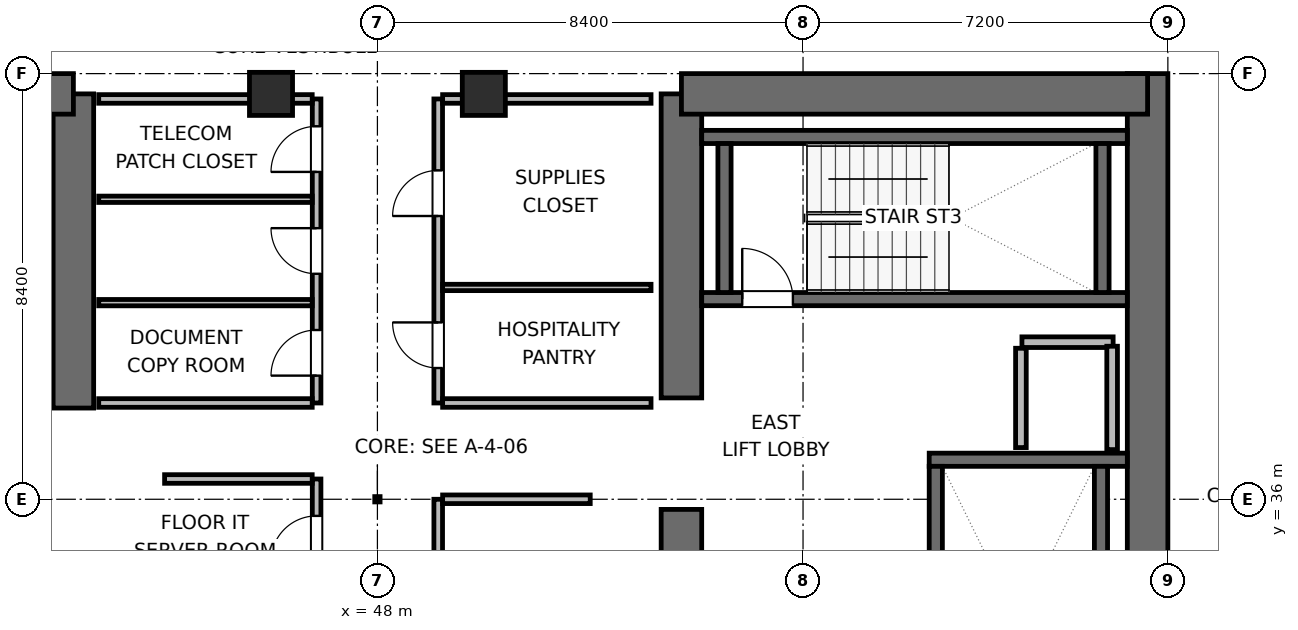
"""IFC4 building model, lengths in metres.
Left out: names, types, materials, properties, quantities, classifications, styles, units other than length and angle.
Written with IfcOpenShell. Run it as: python <this file> out.ifc"""

import sys

from ifc_helpers import new_model, si_unit, direction, frame, frame_2d, origin, origin_2d, place, context, subcontext, project, spatial, rectangle, extrude, element, fill, save


model = new_model("IFC4")
c1 = context("Model", 3, precision=1e-05, world=origin(), true_north=direction((0.0, 1.0)))
c2 = subcontext(c1, "Body", "Model", "MODEL_VIEW")
j1 = project(units=[si_unit("LENGTHUNIT", "METRE"), si_unit("PLANEANGLEUNIT", "RADIAN")], contexts=[c1])
p1 = place(None, origin())
s1 = spatial("IfcSite", under=j1, at=p1, CompositionType="ELEMENT")
p2 = place(p1, origin())
s2 = spatial("IfcBuilding", under=s1, at=p2, CompositionType="ELEMENT")
p3 = place(p2, frame((0.0, 0.0, 105.3)))
s3 = spatial("IfcBuildingStorey", under=s2, at=p3, CompositionType="ELEMENT", Elevation=105.3)
p4 = place(p3, frame((42.0, 37.8, 0.0), z_axis=(0.0, 0.0, 1.0), x_axis=(0.0, 1.0, 0.0)))
e1 = element("IfcWall", 1, at=p4, inside=s3, PredefinedType="SHEAR", context=c2, shape_type="SweptSolid", body=[
    extrude(rectangle(XDim=6.2, YDim=0.8, at=frame_2d((3.1, 0.0))), origin(), (0.0, 0.0, 1.0), 3.9),
])
p5 = place(p3, frame((32.8, 44.0, 0.0), z_axis=(0.0, 0.0, 1.0), x_axis=(1.0, 0.0, 0.0)))
e2 = element("IfcWall", 2, at=p5, inside=s3, PredefinedType="SHEAR", context=c2, shape_type="SweptSolid", body=[
    extrude(rectangle(XDim=9.2, YDim=0.8, at=frame_2d((4.6, 0.0))), origin(), (0.0, 0.0, 1.0), 3.9),
])
p6 = place(p5, frame((0.975, 0.0, 0.0)))
e3 = element("IfcOpeningElement", 3, at=p6, cuts=e2, PredefinedType="OPENING", context=c2, shape_type="SweptSolid", body=[
    extrude(rectangle(XDim=0.95, YDim=2.04, at=frame_2d((0.475, 1.02))), frame((0.0, 0.41, 0.0), z_axis=(0.0, -1.0, 0.0), x_axis=(1.0, 0.0, 0.0)), (0.0, 0.0, 1.0), 0.82),
])
p7 = place(p5, frame((4.225, 0.0, 0.0)))
e4 = element("IfcOpeningElement", 4, at=p7, cuts=e2, PredefinedType="OPENING", context=c2, shape_type="SweptSolid", body=[
    extrude(rectangle(XDim=0.9, YDim=2.02, at=frame_2d((0.45, 1.01))), frame((0.0, 0.41, 0.0), z_axis=(0.0, -1.0, 0.0), x_axis=(1.0, 0.0, 0.0)), (0.0, 0.0, 1.0), 0.82),
])
p8 = place(p5, frame((7.125, 0.0, 0.0)))
e5 = element("IfcOpeningElement", 5, at=p8, cuts=e2, PredefinedType="OPENING", context=c2, shape_type="SweptSolid", body=[
    extrude(rectangle(XDim=0.9, YDim=2.02, at=frame_2d((0.45, 1.01))), frame((0.0, 0.41, 0.0), z_axis=(0.0, -1.0, 0.0), x_axis=(1.0, 0.0, 0.0)), (0.0, 0.0, 1.0), 0.82),
])
p9 = place(p3, frame((54.0, 28.0, 0.0), z_axis=(0.0, 0.0, 1.0), x_axis=(0.0, 1.0, 0.0)))
e6 = element("IfcWall", 6, at=p9, inside=s3, PredefinedType="SHEAR", context=c2, shape_type="SweptSolid", body=[
    extrude(rectangle(XDim=7.8, YDim=0.8, at=frame_2d((3.9, 0.0))), origin(), (0.0, 0.0, 1.0), 3.9),
])
p10 = place(p3, frame((54.0, 38.0, 0.0), z_axis=(0.0, 0.0, 1.0), x_axis=(0.0, 1.0, 0.0)))
e7 = element("IfcWall", 7, at=p10, inside=s3, PredefinedType="SHEAR", context=c2, shape_type="SweptSolid", body=[
    extrude(rectangle(XDim=6.0, YDim=0.8, at=frame_2d((3.0, 0.0))), origin(), (0.0, 0.0, 1.0), 3.9),
])
p11 = place(p3, frame((63.2, 27.6, 0.0), z_axis=(0.0, 0.0, 1.0), x_axis=(0.0, 1.0, 0.0)))
e8 = element("IfcWall", 8, at=p11, inside=s3, PredefinedType="SHEAR", context=c2, shape_type="SweptSolid", body=[
    extrude(rectangle(XDim=16.8, YDim=0.8, at=frame_2d((8.4, 0.0))), origin(), (0.0, 0.0, 1.0), 3.9),
])
p12 = place(p3, frame((54.0, 44.0, 0.0), z_axis=(0.0, 0.0, 1.0), x_axis=(1.0, 0.0, 0.0)))
e9 = element("IfcWall", 9, at=p12, inside=s3, PredefinedType="SHEAR", context=c2, shape_type="SweptSolid", body=[
    extrude(rectangle(XDim=9.2, YDim=0.8, at=frame_2d((4.6, 0.0))), origin(), (0.0, 0.0, 1.0), 3.9),
])
p13 = place(p3, frame((58.89, 36.78, 0.0), z_axis=(0.0, 0.0, 1.0), x_axis=(1.0, 0.0, 0.0)))
e10 = element("IfcWall", 10, at=p13, inside=s3, PredefinedType="SHEAR", context=c2, shape_type="SweptSolid", body=[
    extrude(rectangle(XDim=3.91, YDim=0.26, at=frame_2d((1.955, 0.0))), origin(), (0.0, 0.0, 1.0), 3.9),
])
p14 = place(p3, frame((59.02, 29.05, 0.0), z_axis=(0.0, 0.0, 1.0), x_axis=(0.0, 1.0, 0.0)))
e11 = element("IfcWall", 11, at=p14, inside=s3, PredefinedType="SHEAR", context=c2, shape_type="SweptSolid", body=[
    extrude(rectangle(XDim=7.6, YDim=0.26, at=frame_2d((3.8, 0.0))), origin(), (0.0, 0.0, 1.0), 3.9),
])
p15 = place(p14, frame((0.3, 0.0, 0.0)))
e12 = element("IfcOpeningElement", 12, at=p15, cuts=e11, PredefinedType="OPENING", context=c2, shape_type="SweptSolid", body=[
    extrude(rectangle(XDim=1.0, YDim=2.04, at=frame_2d((0.5, 1.02))), frame((0.0, 0.14, 0.0), z_axis=(0.0, -1.0, 0.0), x_axis=(1.0, 0.0, 0.0)), (0.0, 0.0, 1.0), 0.28),
])
p16 = place(p3, frame((62.28, 29.05, 0.0), z_axis=(0.0, 0.0, 1.0), x_axis=(0.0, 1.0, 0.0)))
e13 = element("IfcWall", 13, at=p16, inside=s3, PredefinedType="SHEAR", context=c2, shape_type="SweptSolid", body=[
    extrude(rectangle(XDim=7.6, YDim=0.26, at=frame_2d((3.8, 0.0))), origin(), (0.0, 0.0, 1.0), 3.9),
])
p17 = place(p3, frame((54.4, 39.95, 0.0), z_axis=(0.0, 0.0, 1.0), x_axis=(1.0, 0.0, 0.0)))
e14 = element("IfcWall", 14, at=p17, inside=s3, PredefinedType="SHEAR", context=c2, shape_type="SweptSolid", body=[
    extrude(rectangle(XDim=8.4, YDim=0.26, at=frame_2d((4.2, 0.0))), origin(), (0.0, 0.0, 1.0), 3.9),
])
p18 = place(p17, frame((0.8, 0.0, 0.0)))
e15 = element("IfcOpeningElement", 15, at=p18, cuts=e14, PredefinedType="OPENING", context=c2, shape_type="SweptSolid", body=[
    extrude(rectangle(XDim=1.0, YDim=2.04, at=frame_2d((0.5, 1.02))), frame((0.0, 0.14, 0.0), z_axis=(0.0, -1.0, 0.0), x_axis=(1.0, 0.0, 0.0)), (0.0, 0.0, 1.0), 0.28),
])
p19 = place(p3, frame((54.4, 43.15, 0.0), z_axis=(0.0, 0.0, 1.0), x_axis=(1.0, 0.0, 0.0)))
e16 = element("IfcWall", 16, at=p19, inside=s3, PredefinedType="SHEAR", context=c2, shape_type="SweptSolid", body=[
    extrude(rectangle(XDim=8.4, YDim=0.26, at=frame_2d((4.2, 0.0))), origin(), (0.0, 0.0, 1.0), 3.9),
])
for number, where, z_axis, x_axis in (
    (17, (54.85, 40.08, 0.0), (0.0, 0.0, 1.0), (0.0, 1.0, 0.0)),
    (18, (62.31, 40.08, 0.0), (0.0, 0.0, 1.0), (0.0, 1.0, 0.0)),
):
    element("IfcWall", number, at=place(p3, frame(where, z_axis=z_axis, x_axis=x_axis)), inside=s3, PredefinedType="SHEAR", context=c2, shape_type="SweptSolid", body=[
        extrude(rectangle(XDim=2.94, YDim=0.26, at=frame_2d((1.47, 0.0))), origin(), (0.0, 0.0, 1.0), 3.9),
    ])
for number, where, z_axis, x_axis in (
    (19, (45.9, 44.0, 0.0), (0.0, 0.0, 1.0), (1.0, 0.0, 0.0)),
    (20, (50.1, 44.0, 0.0), (0.0, 0.0, 1.0), (1.0, 0.0, 0.0)),
):
    element("IfcColumn", number, at=place(p3, frame(where, z_axis=z_axis, x_axis=x_axis)), inside=s3, PredefinedType="COLUMN", context=c2, shape_type="SweptSolid", body=[
        extrude(rectangle(XDim=0.85, YDim=0.85, at=origin_2d()), origin(), (0.0, 0.0, 1.0), 3.9),
    ])
p20 = place(p3, frame((60.72, 39.1, 0.0), z_axis=(0.0, 0.0, 1.0), x_axis=(1.0, 0.0, 0.0)))
e21 = element("IfcWall", 21, at=p20, inside=s3, PredefinedType="PARTITIONING", context=c2, shape_type="SweptSolid", body=[
    extrude(rectangle(XDim=1.8, YDim=0.21, at=frame_2d((0.9, 0.0))), origin(), (0.0, 0.0, 1.0), 3.64),
])
p21 = place(p3, frame((60.7, 37.02, 0.0), z_axis=(0.0, 0.0, 1.0), x_axis=(0.0, 1.0, 0.0)))
e22 = element("IfcWall", 22, at=p21, inside=s3, PredefinedType="PARTITIONING", context=c2, shape_type="SweptSolid", body=[
    extrude(rectangle(XDim=1.96, YDim=0.21, at=frame_2d((0.98, 0.0))), origin(), (0.0, 0.0, 1.0), 3.64),
])
p22 = place(p3, frame((62.5, 36.98, 0.0), z_axis=(0.0, 0.0, 1.0), x_axis=(0.0, 1.0, 0.0)))
e23 = element("IfcWall", 23, at=p22, inside=s3, PredefinedType="PARTITIONING", context=c2, shape_type="SweptSolid", body=[
    extrude(rectangle(XDim=2.04, YDim=0.21, at=frame_2d((1.02, 0.0))), origin(), (0.0, 0.0, 1.0), 3.64),
])
p23 = place(p3, frame((46.8, 32.6, 0.0), z_axis=(0.0, 0.0, 1.0), x_axis=(0.0, 1.0, 0.0)))
e24 = element("IfcWall", 24, at=p23, inside=s3, PredefinedType="PARTITIONING", context=c2, shape_type="SweptSolid", body=[
    extrude(rectangle(XDim=3.8, YDim=0.17, at=frame_2d((1.9, 0.0))), origin(), (0.0, 0.0, 1.0), 3.64),
])
p24 = place(p23, frame((0.272, 0.0, 0.0)))
e25 = element("IfcOpeningElement", 25, at=p24, cuts=e24, PredefinedType="OPENING", context=c2, shape_type="SweptSolid", body=[
    extrude(rectangle(XDim=0.9, YDim=2.02, at=frame_2d((0.45, 1.01))), frame((0.0, 0.095, 0.0), z_axis=(0.0, -1.0, 0.0), x_axis=(1.0, 0.0, 0.0)), (0.0, 0.0, 1.0), 0.19),
])
p25 = place(p23, frame((2.172, 0.0, 0.0)))
e26 = element("IfcOpeningElement", 26, at=p25, cuts=e24, PredefinedType="OPENING", context=c2, shape_type="SweptSolid", body=[
    extrude(rectangle(XDim=0.9, YDim=2.02, at=frame_2d((0.45, 1.01))), frame((0.0, 0.095, 0.0), z_axis=(0.0, -1.0, 0.0), x_axis=(1.0, 0.0, 0.0)), (0.0, 0.0, 1.0), 0.19),
])
p26 = place(p3, frame((43.8, 36.4, 0.0), z_axis=(0.0, 0.0, 1.0), x_axis=(1.0, 0.0, 0.0)))
e27 = element("IfcWall", 27, at=p26, inside=s3, PredefinedType="PARTITIONING", context=c2, shape_type="SweptSolid", body=[
    extrude(rectangle(XDim=2.913, YDim=0.17, at=frame_2d((1.457, 0.0))), origin(), (0.0, 0.0, 1.0), 3.64),
])
p27 = place(p3, frame((49.2, 32.6, 0.0), z_axis=(0.0, 0.0, 1.0), x_axis=(0.0, 1.0, 0.0)))
e28 = element("IfcWall", 28, at=p27, inside=s3, PredefinedType="PARTITIONING", context=c2, shape_type="SweptSolid", body=[
    extrude(rectangle(XDim=3.4, YDim=0.17, at=frame_2d((1.7, 0.0))), origin(), (0.0, 0.0, 1.0), 3.64),
])
p28 = place(p27, frame((0.638, 0.0, 0.0)))
e29 = element("IfcOpeningElement", 29, at=p28, cuts=e28, PredefinedType="OPENING", context=c2, shape_type="SweptSolid", body=[
    extrude(rectangle(XDim=0.9, YDim=2.02, at=frame_2d((0.45, 1.01))), frame((0.0, 0.095, 0.0), z_axis=(0.0, -1.0, 0.0), x_axis=(1.0, 0.0, 0.0)), (0.0, 0.0, 1.0), 0.19),
])
p29 = place(p3, frame((49.287, 36.0, 0.0), z_axis=(0.0, 0.0, 1.0), x_axis=(1.0, 0.0, 0.0)))
e30 = element("IfcWall", 30, at=p29, inside=s3, PredefinedType="PARTITIONING", context=c2, shape_type="SweptSolid", body=[
    extrude(rectangle(XDim=2.913, YDim=0.17, at=frame_2d((1.457, 0.0))), origin(), (0.0, 0.0, 1.0), 3.64),
])
p30 = place(p3, frame((46.8, 37.9, 0.0), z_axis=(0.0, 0.0, 1.0), x_axis=(0.0, 1.0, 0.0)))
e31 = element("IfcWall", 31, at=p30, inside=s3, PredefinedType="PARTITIONING", context=c2, shape_type="SweptSolid", body=[
    extrude(rectangle(XDim=6.0, YDim=0.17, at=frame_2d((3.0, 0.0))), origin(), (0.0, 0.0, 1.0), 3.64),
])
p31 = place(p30, frame((0.54, 0.0, 0.0)))
e32 = element("IfcOpeningElement", 32, at=p31, cuts=e31, PredefinedType="OPENING", context=c2, shape_type="SweptSolid", body=[
    extrude(rectangle(XDim=0.9, YDim=2.02, at=frame_2d((0.45, 1.01))), frame((0.0, 0.095, 0.0), z_axis=(0.0, -1.0, 0.0), x_axis=(1.0, 0.0, 0.0)), (0.0, 0.0, 1.0), 0.19),
])
p32 = place(p30, frame((2.55, 0.0, 0.0)))
e33 = element("IfcOpeningElement", 33, at=p32, cuts=e31, PredefinedType="OPENING", context=c2, shape_type="SweptSolid", body=[
    extrude(rectangle(XDim=0.9, YDim=2.02, at=frame_2d((0.45, 1.01))), frame((0.0, 0.095, 0.0), z_axis=(0.0, -1.0, 0.0), x_axis=(1.0, 0.0, 0.0)), (0.0, 0.0, 1.0), 0.19),
])
p33 = place(p30, frame((4.56, 0.0, 0.0)))
e34 = element("IfcOpeningElement", 34, at=p33, cuts=e31, PredefinedType="OPENING", context=c2, shape_type="SweptSolid", body=[
    extrude(rectangle(XDim=0.9, YDim=2.02, at=frame_2d((0.45, 1.01))), frame((0.0, 0.095, 0.0), z_axis=(0.0, -1.0, 0.0), x_axis=(1.0, 0.0, 0.0)), (0.0, 0.0, 1.0), 0.19),
])
p34 = place(p3, frame((42.5, 37.9, 0.0), z_axis=(0.0, 0.0, 1.0), x_axis=(1.0, 0.0, 0.0)))
e35 = element("IfcWall", 35, at=p34, inside=s3, PredefinedType="PARTITIONING", context=c2, shape_type="SweptSolid", body=[
    extrude(rectangle(XDim=4.213, YDim=0.17, at=frame_2d((2.106, 0.0))), origin(), (0.0, 0.0, 1.0), 3.64),
])
p35 = place(p3, frame((42.5, 43.9, 0.0), z_axis=(0.0, 0.0, 1.0), x_axis=(1.0, 0.0, 0.0)))
e36 = element("IfcWall", 36, at=p35, inside=s3, PredefinedType="PARTITIONING", context=c2, shape_type="SweptSolid", body=[
    extrude(rectangle(XDim=4.213, YDim=0.17, at=frame_2d((2.106, 0.0))), origin(), (0.0, 0.0, 1.0), 2.525),
])
for number, where, z_axis, x_axis in (
    (37, (42.5, 39.88, 0.0), (0.0, 0.0, 1.0), (1.0, 0.0, 0.0)),
    (38, (42.5, 41.92, 0.0), (0.0, 0.0, 1.0), (1.0, 0.0, 0.0)),
):
    element("IfcWall", number, at=place(p3, frame(where, z_axis=z_axis, x_axis=x_axis)), inside=s3, PredefinedType="PARTITIONING", context=c2, shape_type="SweptSolid", body=[
        extrude(rectangle(XDim=4.213, YDim=0.125, at=frame_2d((2.106, 0.0))), origin(), (0.0, 0.0, 1.0), 3.64),
    ])
p36 = place(p3, frame((49.2, 37.9, 0.0), z_axis=(0.0, 0.0, 1.0), x_axis=(0.0, 1.0, 0.0)))
e39 = element("IfcWall", 39, at=p36, inside=s3, PredefinedType="PARTITIONING", context=c2, shape_type="SweptSolid", body=[
    extrude(rectangle(XDim=6.0, YDim=0.17, at=frame_2d((3.0, 0.0))), origin(), (0.0, 0.0, 1.0), 3.64),
])
p37 = place(p36, frame((0.69, 0.0, 0.0)))
e40 = element("IfcOpeningElement", 40, at=p37, cuts=e39, PredefinedType="OPENING", context=c2, shape_type="SweptSolid", body=[
    extrude(rectangle(XDim=0.9, YDim=2.02, at=frame_2d((0.45, 1.01))), frame((0.0, 0.095, 0.0), z_axis=(0.0, -1.0, 0.0), x_axis=(1.0, 0.0, 0.0)), (0.0, 0.0, 1.0), 0.19),
])
p38 = place(p36, frame((3.69, 0.0, 0.0)))
e41 = element("IfcOpeningElement", 41, at=p38, cuts=e39, PredefinedType="OPENING", context=c2, shape_type="SweptSolid", body=[
    extrude(rectangle(XDim=0.9, YDim=2.02, at=frame_2d((0.45, 1.01))), frame((0.0, 0.095, 0.0), z_axis=(0.0, -1.0, 0.0), x_axis=(1.0, 0.0, 0.0)), (0.0, 0.0, 1.0), 0.19),
])
p39 = place(p3, frame((49.287, 37.9, 0.0), z_axis=(0.0, 0.0, 1.0), x_axis=(1.0, 0.0, 0.0)))
e42 = element("IfcWall", 42, at=p39, inside=s3, PredefinedType="PARTITIONING", context=c2, shape_type="SweptSolid", body=[
    extrude(rectangle(XDim=4.113, YDim=0.17, at=frame_2d((2.056, 0.0))), origin(), (0.0, 0.0, 1.0), 3.64),
])
p40 = place(p3, frame((49.287, 43.9, 0.0), z_axis=(0.0, 0.0, 1.0), x_axis=(1.0, 0.0, 0.0)))
e43 = element("IfcWall", 43, at=p40, inside=s3, PredefinedType="PARTITIONING", context=c2, shape_type="SweptSolid", body=[
    extrude(rectangle(XDim=4.113, YDim=0.17, at=frame_2d((2.056, 0.0))), origin(), (0.0, 0.0, 1.0), 2.525),
])
p41 = place(p3, frame((49.287, 40.18, 0.0), z_axis=(0.0, 0.0, 1.0), x_axis=(1.0, 0.0, 0.0)))
e44 = element("IfcWall", 44, at=p41, inside=s3, PredefinedType="PARTITIONING", context=c2, shape_type="SweptSolid", body=[
    extrude(rectangle(XDim=4.113, YDim=0.125, at=frame_2d((2.056, 0.0))), origin(), (0.0, 0.0, 1.0), 3.64),
])
p42 = place(p18, origin())
e45 = element("IfcDoor", 45, at=p42, inside=s3, OperationType="SINGLE_SWING_LEFT", PredefinedType="DOOR", context=c2, shape_type="SweptSolid", body=[
    extrude(rectangle(XDim=1.0, YDim=2.04, at=frame_2d((0.5, 1.02))), frame((0.0, 0.025, 0.0), z_axis=(0.0, -1.0, 0.0), x_axis=(1.0, 0.0, 0.0)), (0.0, 0.0, 1.0), 0.05),
])
fill(e15, e45)
p43 = place(p25, origin())
e46 = element("IfcDoor", 46, at=p43, inside=s3, OperationType="SINGLE_SWING_LEFT", PredefinedType="DOOR", context=c2, shape_type="SweptSolid", body=[
    extrude(rectangle(XDim=0.9, YDim=2.02, at=frame_2d((0.45, 1.01))), frame((0.0, 0.025, 0.0), z_axis=(0.0, -1.0, 0.0), x_axis=(1.0, 0.0, 0.0)), (0.0, 0.0, 1.0), 0.05),
])
fill(e26, e46)
p44 = place(p31, origin())
e47 = element("IfcDoor", 47, at=p44, inside=s3, OperationType="SINGLE_SWING_LEFT", PredefinedType="DOOR", context=c2, shape_type="SweptSolid", body=[
    extrude(rectangle(XDim=0.9, YDim=2.02, at=frame_2d((0.45, 1.01))), frame((0.0, 0.025, 0.0), z_axis=(0.0, -1.0, 0.0), x_axis=(1.0, 0.0, 0.0)), (0.0, 0.0, 1.0), 0.05),
])
fill(e32, e47)
p45 = place(p32, origin())
e48 = element("IfcDoor", 48, at=p45, inside=s3, OperationType="SINGLE_SWING_RIGHT", PredefinedType="DOOR", context=c2, shape_type="SweptSolid", body=[
    extrude(rectangle(XDim=0.9, YDim=2.02, at=frame_2d((0.45, 1.01))), frame((0.0, 0.025, 0.0), z_axis=(0.0, -1.0, 0.0), x_axis=(1.0, 0.0, 0.0)), (0.0, 0.0, 1.0), 0.05),
])
fill(e33, e48)
p46 = place(p33, origin())
e49 = element("IfcDoor", 49, at=p46, inside=s3, OperationType="SINGLE_SWING_LEFT", PredefinedType="DOOR", context=c2, shape_type="SweptSolid", body=[
    extrude(rectangle(XDim=0.9, YDim=2.02, at=frame_2d((0.45, 1.01))), frame((0.0, 0.025, 0.0), z_axis=(0.0, -1.0, 0.0), x_axis=(1.0, 0.0, 0.0)), (0.0, 0.0, 1.0), 0.05),
])
fill(e34, e49)
p47 = place(p37, origin())
e50 = element("IfcDoor", 50, at=p47, inside=s3, OperationType="SINGLE_SWING_RIGHT", PredefinedType="DOOR", context=c2, shape_type="SweptSolid", body=[
    extrude(rectangle(XDim=0.9, YDim=2.02, at=frame_2d((0.45, 1.01))), frame((0.0, 0.025, 0.0), z_axis=(0.0, -1.0, 0.0), x_axis=(1.0, 0.0, 0.0)), (0.0, 0.0, 1.0), 0.05),
])
fill(e40, e50)
p48 = place(p38, origin())
e51 = element("IfcDoor", 51, at=p48, inside=s3, OperationType="SINGLE_SWING_LEFT", PredefinedType="DOOR", context=c2, shape_type="SweptSolid", body=[
    extrude(rectangle(XDim=0.9, YDim=2.02, at=frame_2d((0.45, 1.01))), frame((0.0, 0.025, 0.0), z_axis=(0.0, -1.0, 0.0), x_axis=(1.0, 0.0, 0.0)), (0.0, 0.0, 1.0), 0.05),
])
fill(e41, e51)
save(model, sys.argv[1])
